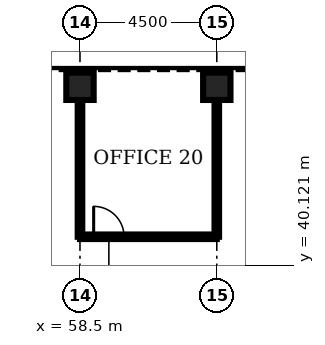
"""IFC4 building model, lengths in metres.
Left out: names, types, materials, properties, quantities, classifications, styles, units other than length and angle.
Written with IfcOpenShell. Run it as: python <this file> out.ifc"""

import sys

from ifc_helpers import new_model, si_unit, direction, frame, frame_2d, origin, origin_2d, place, context, subcontext, project, spatial, rectangle, hollow_rectangle, extrude, element, fill, save


model = new_model("IFC4")
c1 = context("Model", 3, precision=1e-05, world=origin(), true_north=direction((0.0, 1.0)))
c2 = subcontext(c1, "Body", "Model", "MODEL_VIEW")
j1 = project(units=[si_unit("LENGTHUNIT", "METRE"), si_unit("PLANEANGLEUNIT", "RADIAN")], contexts=[c1])
p1 = place(None, origin())
s1 = spatial("IfcSite", under=j1, at=p1, CompositionType="ELEMENT")
p2 = place(p1, origin())
s2 = spatial("IfcBuilding", under=s1, at=p2, CompositionType="ELEMENT")
p3 = place(p2, frame((0.0, 0.0, 138.3)))
s3 = spatial("IfcBuildingStorey", under=s2, at=p3, CompositionType="ELEMENT", Elevation=138.3)
for number, where, z_axis, x_axis in (
    (1, (63.0, 46.0, 0.0), (0.0, 0.0, 1.0), (0.0, 1.0, 0.0)),
    (2, (58.5, 46.0, 0.0), (0.0, 0.0, 1.0), (0.0, 1.0, 0.0)),
):
    element("IfcColumn", number, at=place(p3, frame(where, z_axis=z_axis, x_axis=x_axis)), inside=s3, PredefinedType="COLUMN", context=c2, shape_type="SweptSolid", body=[
        extrude(hollow_rectangle(XDim=0.9, YDim=0.9, WallThickness=0.1, at=origin_2d()), origin(), (0.0, 0.0, 1.0), 4.2),
    ])
p4 = place(p3, frame((58.5, 41.05, 0.0), z_axis=(0.0, 0.0, 1.0), x_axis=(1.0, 0.0, 0.0)))
e3 = element("IfcWall", 3, at=p4, inside=s3, PredefinedType="PARTITIONING", context=c2, shape_type="SweptSolid", body=[
    extrude(rectangle(XDim=4.5, YDim=0.15, at=frame_2d((2.25, 0.0))), origin(), (0.0, 0.0, 1.0), 3.0),
])
p5 = place(p4, frame((0.45, 0.0, 0.0)))
e4 = element("IfcOpeningElement", 4, at=p5, cuts=e3, PredefinedType="OPENING", context=c2, shape_type="SweptSolid", body=[
    extrude(rectangle(XDim=1.0, YDim=2.1, at=frame_2d((0.5, 1.05))), frame((0.0, 0.085, 0.0), z_axis=(0.0, -1.0, 0.0), x_axis=(1.0, 0.0, 0.0)), (0.0, 0.0, 1.0), 0.17),
])
for number, where, z_axis, x_axis in (
    (5, (58.5, 41.05, 0.0), (0.0, 0.0, 1.0), (0.0, 1.0, 0.0)),
    (6, (63.0, 41.05, 0.0), (0.0, 0.0, 1.0), (0.0, 1.0, 0.0)),
):
    element("IfcWall", number, at=place(p3, frame(where, z_axis=z_axis, x_axis=x_axis)), inside=s3, PredefinedType="PARTITIONING", context=c2, shape_type="SweptSolid", body=[
        extrude(rectangle(XDim=4.5, YDim=0.15, at=frame_2d((2.25, 0.0))), origin(), (0.0, 0.0, 1.0), 3.0),
    ])
p6 = place(p5, origin())
e7 = element("IfcDoor", 7, at=p6, inside=s3, OperationType="SINGLE_SWING_LEFT", PredefinedType="DOOR", context=c2, shape_type="SweptSolid", body=[
    extrude(rectangle(XDim=1.0, YDim=2.1, at=frame_2d((0.5, 1.05))), frame((0.0, 0.025, 0.0), z_axis=(0.0, -1.0, 0.0), x_axis=(1.0, 0.0, 0.0)), (0.0, 0.0, 1.0), 0.05),
])
fill(e4, e7)
save(model, sys.argv[1])
